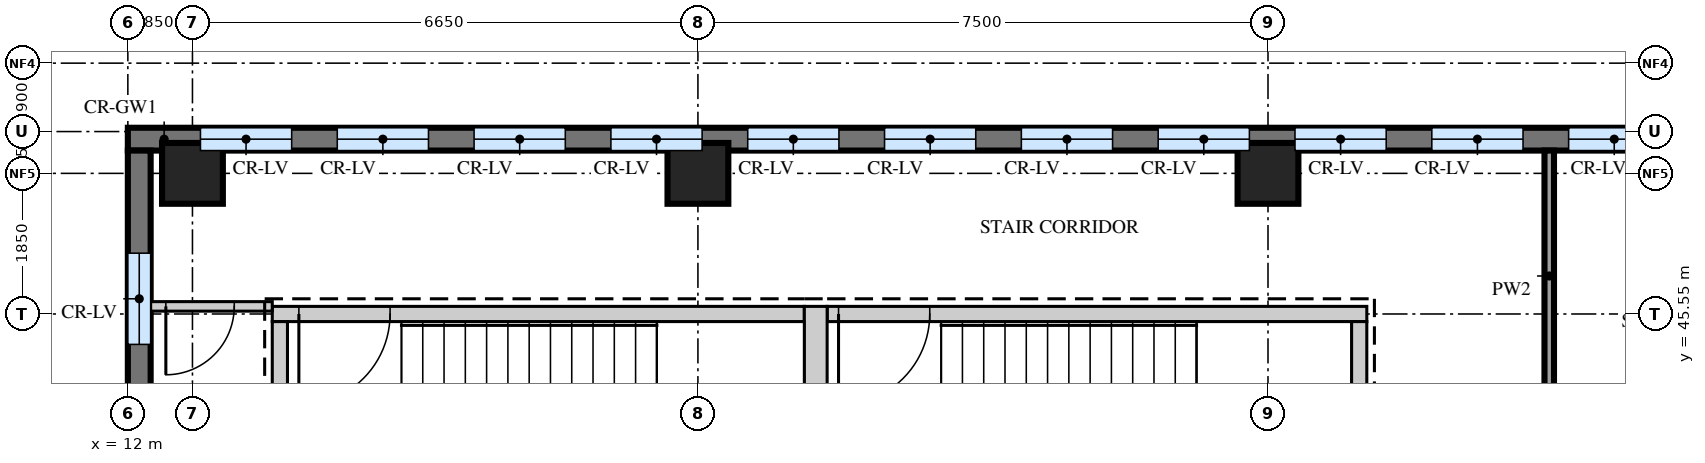
"""IFC4 building model, lengths in metres.
Left out: names, types, materials, properties, quantities, classifications, styles, units other than length and angle.
Written with IfcOpenShell. Run it as: python <this file> out.ifc"""

import sys

from ifc_helpers import new_model, si_unit, direction, frame, frame_2d, origin, origin_2d, place, context, subcontext, project, spatial, rectangle, extrude, source, transform, mapped, element, fill, save


model = new_model("IFC4")
c1 = context("Model", 3, precision=1e-05, world=origin(), true_north=direction((0.0, 1.0)))
c2 = subcontext(c1, "Body", "Model", "MODEL_VIEW")
j1 = project(units=[si_unit("LENGTHUNIT", "METRE"), si_unit("PLANEANGLEUNIT", "RADIAN")], contexts=[c1])
p1 = place(None, origin())
s1 = spatial("IfcSite", under=j1, at=p1, CompositionType="ELEMENT")
p2 = place(p1, origin())
s2 = spatial("IfcBuilding", under=s1, at=p2, CompositionType="ELEMENT")
p3 = place(p2, frame((0.0, 0.0, 334.7)))
s3 = spatial("IfcBuildingStorey", under=s2, at=p3, CompositionType="ELEMENT", Elevation=334.7)
m1 = source(origin(), c2, "Body", "SweptSolid", [
    extrude(rectangle(XDim=7.0, YDim=0.2, at=frame_2d((3.5, 0.0))), origin(), (0.0, 0.0, 1.0), 4.25),
])
p4 = place(p3, frame((13.9, 45.55, 0.0), z_axis=(0.0, 0.0, 1.0), x_axis=(1.0, 0.0, 0.0)))
e1 = element("IfcWall", 1, at=p4, inside=s3, PredefinedType="SHEAR", context=c2, shape_type="MappedRepresentation", body=[
    mapped(m1, transform((0.0, 0.0, 0.0))),
])
m2 = source(origin(), c2, "Body", "SweptSolid", [
    extrude(rectangle(XDim=1.2, YDim=2.1, at=frame_2d((0.6, 1.05))), frame((0.0, 0.11, 0.0), z_axis=(0.0, -1.0, 0.0), x_axis=(1.0, 0.0, 0.0)), (0.0, 0.0, 1.0), 0.22),
])
p5 = place(p4, frame((0.35, 0.0, 0.0)))
e2 = element("IfcOpeningElement", 2, at=p5, cuts=e1, PredefinedType="OPENING", context=c2, shape_type="MappedRepresentation", body=[
    mapped(m2, transform((0.0, 0.0, 0.0))),
])
m3 = source(origin(), c2, "Body", "SweptSolid", [
    extrude(rectangle(XDim=7.1, YDim=0.2, at=frame_2d((3.55, 0.0))), origin(), (0.0, 0.0, 1.0), 4.25),
])
p6 = place(p3, frame((21.2, 45.55, 0.0), z_axis=(0.0, 0.0, 1.0), x_axis=(1.0, 0.0, 0.0)))
e3 = element("IfcWall", 3, at=p6, inside=s3, PredefinedType="SHEAR", context=c2, shape_type="MappedRepresentation", body=[
    mapped(m3, transform((0.0, 0.0, 0.0))),
])
p7 = place(p6, frame((0.15, 0.0, 0.0)))
e4 = element("IfcOpeningElement", 4, at=p7, cuts=e3, PredefinedType="OPENING", context=c2, shape_type="MappedRepresentation", body=[
    mapped(m2, transform((0.0, 0.0, 0.0))),
])
m4 = source(origin(), c2, "Body", "SweptSolid", [
    extrude(rectangle(XDim=3.75, YDim=0.3, at=frame_2d((1.875, 0.0))), origin(), (0.0, 0.0, 1.0), 4.25),
])
p8 = place(p3, frame((21.05, 41.9, 0.0), z_axis=(0.0, 0.0, 1.0), x_axis=(0.0, 1.0, 0.0)))
e5 = element("IfcWall", 5, at=p8, inside=s3, PredefinedType="SHEAR", context=c2, shape_type="MappedRepresentation", body=[
    mapped(m4, transform((0.0, 0.0, 0.0))),
])
m5 = source(origin(), c2, "Body", "SweptSolid", [
    extrude(rectangle(XDim=3.35, YDim=0.2, at=frame_2d((1.675, 0.0))), origin(), (0.0, 0.0, 1.0), 4.25),
])
for number, where, z_axis, x_axis in (
    (6, (14.0, 42.1, 0.0), (0.0, 0.0, 1.0), (0.0, 1.0, 0.0)),
    (7, (28.2, 42.1, 0.0), (0.0, 0.0, 1.0), (0.0, 1.0, 0.0)),
):
    element("IfcWall", number, at=place(p3, frame(where, z_axis=z_axis, x_axis=x_axis)), inside=s3, PredefinedType="SHEAR", context=c2, shape_type="MappedRepresentation", body=[
        mapped(m5, transform((0.0, 0.0, 0.0))),
    ])
m6 = source(origin(), c2, "Body", "SweptSolid", [
    extrude(rectangle(XDim=0.8, YDim=0.8, at=origin_2d()), origin(), (0.0, 0.0, 1.0), 4.5),
])
for number, where, z_axis, x_axis in (
    (8, (12.85, 47.4, 0.0), (0.0, 0.0, 1.0), (1.0, 0.0, 0.0)),
    (9, (19.5, 47.4, 0.0), (0.0, 0.0, 1.0), (1.0, 0.0, 0.0)),
    (10, (27.0, 47.4, 0.0), (0.0, 0.0, 1.0), (1.0, 0.0, 0.0)),
):
    element("IfcColumn", number, at=place(p3, frame(where, z_axis=z_axis, x_axis=x_axis)), inside=s3, PredefinedType="COLUMN", context=c2, shape_type="MappedRepresentation", body=[
        mapped(m6, transform((0.0, 0.0, 0.0))),
    ])
m7 = source(origin(), c2, "Body", "SweptSolid", [
    extrude(rectangle(XDim=21.105, YDim=0.3, at=frame_2d((10.553, 0.0))), origin(), (0.0, 0.0, 1.0), 4.5),
])
p9 = place(p3, frame((33.105, 47.85, 0.0), z_axis=(0.0, 0.0, 1.0), x_axis=(-1.0, 0.0, 0.0)))
e11 = element("IfcWall", 11, at=p9, inside=s3, PredefinedType="SOLIDWALL", context=c2, shape_type="MappedRepresentation", body=[
    mapped(m7, transform((0.0, 0.0, 0.0))),
])
m8 = source(origin(), c2, "Body", "SweptSolid", [
    extrude(rectangle(XDim=1.2, YDim=2.4, at=frame_2d((0.6, 1.2))), frame((0.0, 0.16, 0.0), z_axis=(0.0, -1.0, 0.0), x_axis=(1.0, 0.0, 0.0)), (0.0, 0.0, 1.0), 0.32),
])
p10 = place(p9, frame((0.95, 0.0, 0.9)))
e12 = element("IfcOpeningElement", 12, at=p10, cuts=e11, PredefinedType="OPENING", context=c2, shape_type="MappedRepresentation", body=[
    mapped(m8, transform((0.0, 0.0, 0.0))),
])
p11 = place(p9, frame((2.75, 0.0, 0.9)))
e13 = element("IfcOpeningElement", 13, at=p11, cuts=e11, PredefinedType="OPENING", context=c2, shape_type="MappedRepresentation", body=[
    mapped(m8, transform((0.0, 0.0, 0.0))),
])
p12 = place(p9, frame((4.55, 0.0, 0.9)))
e14 = element("IfcOpeningElement", 14, at=p12, cuts=e11, PredefinedType="OPENING", context=c2, shape_type="MappedRepresentation", body=[
    mapped(m8, transform((0.0, 0.0, 0.0))),
])
p13 = place(p9, frame((6.35, 0.0, 0.9)))
e15 = element("IfcOpeningElement", 15, at=p13, cuts=e11, PredefinedType="OPENING", context=c2, shape_type="MappedRepresentation", body=[
    mapped(m8, transform((0.0, 0.0, 0.0))),
])
p14 = place(p9, frame((8.15, 0.0, 0.9)))
e16 = element("IfcOpeningElement", 16, at=p14, cuts=e11, PredefinedType="OPENING", context=c2, shape_type="MappedRepresentation", body=[
    mapped(m8, transform((0.0, 0.0, 0.0))),
])
p15 = place(p9, frame((9.95, 0.0, 0.9)))
e17 = element("IfcOpeningElement", 17, at=p15, cuts=e11, PredefinedType="OPENING", context=c2, shape_type="MappedRepresentation", body=[
    mapped(m8, transform((0.0, 0.0, 0.0))),
])
p16 = place(p9, frame((11.75, 0.0, 0.9)))
e18 = element("IfcOpeningElement", 18, at=p16, cuts=e11, PredefinedType="OPENING", context=c2, shape_type="MappedRepresentation", body=[
    mapped(m8, transform((0.0, 0.0, 0.0))),
])
p17 = place(p9, frame((13.55, 0.0, 0.9)))
e19 = element("IfcOpeningElement", 19, at=p17, cuts=e11, PredefinedType="OPENING", context=c2, shape_type="MappedRepresentation", body=[
    mapped(m8, transform((0.0, 0.0, 0.0))),
])
p18 = place(p9, frame((15.35, 0.0, 0.9)))
e20 = element("IfcOpeningElement", 20, at=p18, cuts=e11, PredefinedType="OPENING", context=c2, shape_type="MappedRepresentation", body=[
    mapped(m8, transform((0.0, 0.0, 0.0))),
])
p19 = place(p9, frame((17.15, 0.0, 0.9)))
e21 = element("IfcOpeningElement", 21, at=p19, cuts=e11, PredefinedType="OPENING", context=c2, shape_type="MappedRepresentation", body=[
    mapped(m8, transform((0.0, 0.0, 0.0))),
])
p20 = place(p9, frame((18.95, 0.0, 0.9)))
e22 = element("IfcOpeningElement", 22, at=p20, cuts=e11, PredefinedType="OPENING", context=c2, shape_type="MappedRepresentation", body=[
    mapped(m8, transform((0.0, 0.0, 0.0))),
])
m9 = source(origin(), c2, "Body", "SweptSolid", [
    extrude(rectangle(XDim=5.7, YDim=0.3, at=frame_2d((2.85, 0.0))), origin(), (0.0, 0.0, 1.0), 4.5),
])
p21 = place(p3, frame((12.15, 47.7, 0.0), z_axis=(0.0, 0.0, 1.0), x_axis=(0.0, -1.0, 0.0)))
e23 = element("IfcWall", 23, at=p21, inside=s3, PredefinedType="SOLIDWALL", context=c2, shape_type="MappedRepresentation", body=[
    mapped(m9, transform((0.0, 0.0, 0.0))),
])
p22 = place(p21, frame((1.35, 0.0, 0.9)))
e24 = element("IfcOpeningElement", 24, at=p22, cuts=e23, PredefinedType="OPENING", context=c2, shape_type="MappedRepresentation", body=[
    mapped(m8, transform((0.0, 0.0, 0.0))),
])
p23 = place(p21, frame((3.15, 0.0, 0.9)))
e25 = element("IfcOpeningElement", 25, at=p23, cuts=e23, PredefinedType="OPENING", context=c2, shape_type="MappedRepresentation", body=[
    mapped(m8, transform((0.0, 0.0, 0.0))),
])
m10 = source(origin(), c2, "Body", "SweptSolid", [
    extrude(rectangle(XDim=8.6, YDim=0.125, at=frame_2d((4.3, 0.0))), origin(), (0.0, 0.0, 1.0), 4.3),
])
p24 = place(p3, frame((30.7, 39.1, 0.0), z_axis=(0.0, 0.0, 1.0), x_axis=(0.0, 1.0, 0.0)))
e26 = element("IfcWall", 26, at=p24, inside=s3, PredefinedType="PARTITIONING", context=c2, shape_type="MappedRepresentation", body=[
    mapped(m10, transform((0.0, 0.0, 0.0))),
])
m11 = source(origin(), c2, "Body", "SweptSolid", [
    extrude(rectangle(XDim=0.9, YDim=2.1, at=frame_2d((0.45, 1.05))), frame((0.0, 0.073, 0.0), z_axis=(0.0, -1.0, 0.0), x_axis=(1.0, 0.0, 0.0)), (0.0, 0.0, 1.0), 0.145),
])
p25 = place(p24, frame((0.8, 0.0, 0.0)))
e27 = element("IfcOpeningElement", 27, at=p25, cuts=e26, PredefinedType="OPENING", context=c2, shape_type="MappedRepresentation", body=[
    mapped(m11, transform((0.0, 0.0, 0.0))),
])
m12 = source(origin(), c2, "Body", "SweptSolid", [
    extrude(rectangle(XDim=1.2, YDim=2.1, at=frame_2d((0.6, 1.05))), frame((0.0, 0.073, 0.0), z_axis=(0.0, -1.0, 0.0), x_axis=(1.0, 0.0, 0.0)), (0.0, 0.0, 1.0), 0.145),
])
p26 = place(p24, frame((4.1, 0.0, 0.0)))
e28 = element("IfcOpeningElement", 28, at=p26, cuts=e26, PredefinedType="OPENING", context=c2, shape_type="MappedRepresentation", body=[
    mapped(m12, transform((0.0, 0.0, 0.0))),
])
m13 = source(origin(), c2, "Body", "SweptSolid", [
    extrude(rectangle(XDim=1.6, YDim=0.125, at=frame_2d((0.8, 0.0))), origin(), (0.0, 0.0, 1.0), 4.3),
])
p27 = place(p3, frame((12.3, 45.65, 0.0), z_axis=(0.0, 0.0, 1.0), x_axis=(1.0, 0.0, 0.0)))
e29 = element("IfcWall", 29, at=p27, inside=s3, PredefinedType="PARTITIONING", context=c2, shape_type="MappedRepresentation", body=[
    mapped(m13, transform((0.0, 0.0, 0.0))),
])
p28 = place(p27, frame((0.2, 0.0, 0.0)))
e30 = element("IfcOpeningElement", 30, at=p28, cuts=e29, PredefinedType="OPENING", context=c2, shape_type="MappedRepresentation", body=[
    mapped(m11, transform((0.0, 0.0, 0.0))),
])
m14 = source(origin(), c2, "Body", "SweptSolid", [
    extrude(rectangle(XDim=1.2, YDim=2.4, at=frame_2d((0.6, 1.2))), frame((0.0, 0.03, 0.0), z_axis=(0.0, -1.0, 0.0), x_axis=(1.0, 0.0, 0.0)), (0.0, 0.0, 1.0), 0.06),
])
p29 = place(p10, origin())
e31 = element("IfcWindow", 31, at=p29, inside=s3, PartitioningType="SINGLE_PANEL", PredefinedType="WINDOW", context=c2, shape_type="MappedRepresentation", body=[
    mapped(m14, transform((0.0, 0.0, 0.0))),
])
fill(e12, e31)
p30 = place(p11, origin())
e32 = element("IfcWindow", 32, at=p30, inside=s3, PartitioningType="SINGLE_PANEL", PredefinedType="WINDOW", context=c2, shape_type="MappedRepresentation", body=[
    mapped(m14, transform((0.0, 0.0, 0.0))),
])
fill(e13, e32)
p31 = place(p12, origin())
e33 = element("IfcWindow", 33, at=p31, inside=s3, PartitioningType="SINGLE_PANEL", PredefinedType="WINDOW", context=c2, shape_type="MappedRepresentation", body=[
    mapped(m14, transform((0.0, 0.0, 0.0))),
])
fill(e14, e33)
p32 = place(p13, origin())
e34 = element("IfcWindow", 34, at=p32, inside=s3, PartitioningType="SINGLE_PANEL", PredefinedType="WINDOW", context=c2, shape_type="MappedRepresentation", body=[
    mapped(m14, transform((0.0, 0.0, 0.0))),
])
fill(e15, e34)
p33 = place(p14, origin())
e35 = element("IfcWindow", 35, at=p33, inside=s3, PartitioningType="SINGLE_PANEL", PredefinedType="WINDOW", context=c2, shape_type="MappedRepresentation", body=[
    mapped(m14, transform((0.0, 0.0, 0.0))),
])
fill(e16, e35)
p34 = place(p15, origin())
e36 = element("IfcWindow", 36, at=p34, inside=s3, PartitioningType="SINGLE_PANEL", PredefinedType="WINDOW", context=c2, shape_type="MappedRepresentation", body=[
    mapped(m14, transform((0.0, 0.0, 0.0))),
])
fill(e17, e36)
p35 = place(p16, origin())
e37 = element("IfcWindow", 37, at=p35, inside=s3, PartitioningType="SINGLE_PANEL", PredefinedType="WINDOW", context=c2, shape_type="MappedRepresentation", body=[
    mapped(m14, transform((0.0, 0.0, 0.0))),
])
fill(e18, e37)
p36 = place(p17, origin())
e38 = element("IfcWindow", 38, at=p36, inside=s3, PartitioningType="SINGLE_PANEL", PredefinedType="WINDOW", context=c2, shape_type="MappedRepresentation", body=[
    mapped(m14, transform((0.0, 0.0, 0.0))),
])
fill(e19, e38)
p37 = place(p18, origin())
e39 = element("IfcWindow", 39, at=p37, inside=s3, PartitioningType="SINGLE_PANEL", PredefinedType="WINDOW", context=c2, shape_type="MappedRepresentation", body=[
    mapped(m14, transform((0.0, 0.0, 0.0))),
])
fill(e20, e39)
p38 = place(p19, origin())
e40 = element("IfcWindow", 40, at=p38, inside=s3, PartitioningType="SINGLE_PANEL", PredefinedType="WINDOW", context=c2, shape_type="MappedRepresentation", body=[
    mapped(m14, transform((0.0, 0.0, 0.0))),
])
fill(e21, e40)
p39 = place(p20, origin())
e41 = element("IfcWindow", 41, at=p39, inside=s3, PartitioningType="SINGLE_PANEL", PredefinedType="WINDOW", context=c2, shape_type="MappedRepresentation", body=[
    mapped(m14, transform((0.0, 0.0, 0.0))),
])
fill(e22, e41)
p40 = place(p22, origin())
e42 = element("IfcWindow", 42, at=p40, inside=s3, PartitioningType="SINGLE_PANEL", PredefinedType="WINDOW", context=c2, shape_type="MappedRepresentation", body=[
    mapped(m14, transform((0.0, 0.0, 0.0))),
])
fill(e24, e42)
m15 = source(origin(), c2, "Body", "SweptSolid", [
    extrude(rectangle(XDim=0.9, YDim=2.1, at=frame_2d((0.45, 1.05))), frame((0.0, 0.025, 0.0), z_axis=(0.0, -1.0, 0.0), x_axis=(1.0, 0.0, 0.0)), (0.0, 0.0, 1.0), 0.05),
])
p41 = place(p28, origin())
e43 = element("IfcDoor", 43, at=p41, inside=s3, OperationType="SINGLE_SWING_LEFT", PredefinedType="DOOR", context=c2, shape_type="MappedRepresentation", body=[
    mapped(m15, transform((0.0, 0.0, 0.0))),
])
fill(e30, e43)
m16 = source(origin(), c2, "Body", "SweptSolid", [
    extrude(rectangle(XDim=1.2, YDim=2.1, at=frame_2d((0.6, 1.05))), frame((0.0, 0.025, 0.0), z_axis=(0.0, -1.0, 0.0), x_axis=(1.0, 0.0, 0.0)), (0.0, 0.0, 1.0), 0.05),
])
p42 = place(p5, origin())
e44 = element("IfcDoor", 44, at=p42, inside=s3, OperationType="SINGLE_SWING_LEFT", PredefinedType="DOOR", context=c2, shape_type="MappedRepresentation", body=[
    mapped(m16, transform((0.0, 0.0, 0.0))),
])
fill(e2, e44)
p43 = place(p7, origin())
e45 = element("IfcDoor", 45, at=p43, inside=s3, OperationType="SINGLE_SWING_LEFT", PredefinedType="DOOR", context=c2, shape_type="MappedRepresentation", body=[
    mapped(m16, transform((0.0, 0.0, 0.0))),
])
fill(e4, e45)
save(model, sys.argv[1])
